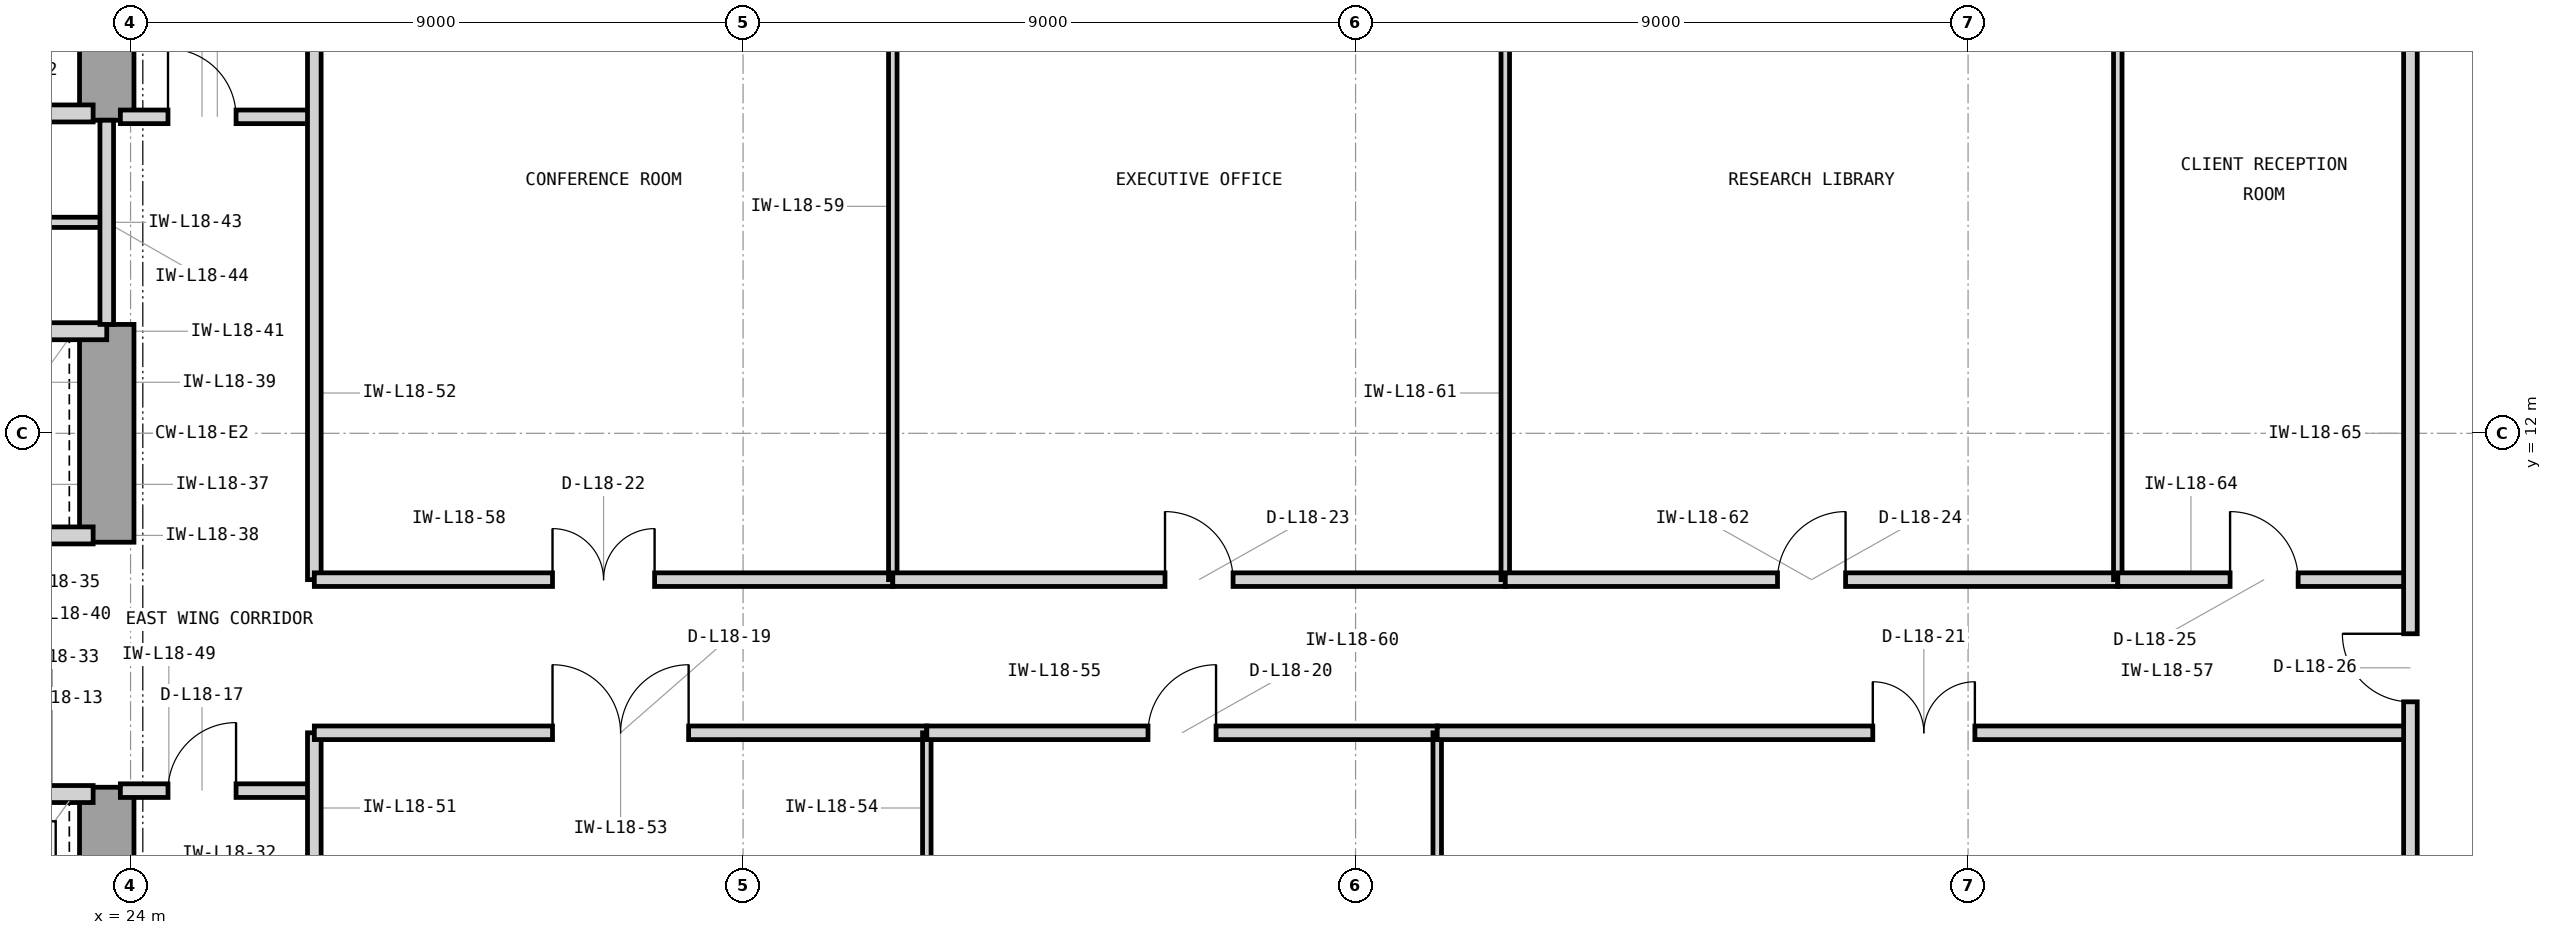
"""IFC4 building model, lengths in metres.
Left out: names, types, materials, properties, quantities, classifications, styles, units other than length and angle.
Written with IfcOpenShell. Run it as: python <this file> out.ifc"""

import sys

from ifc_helpers import new_model, si_unit, direction, frame, frame_2d, origin, place, context, subcontext, project, spatial, rectangle, extrude, element, fill, save


model = new_model("IFC4")
c1 = context("Model", 3, precision=1e-05, world=origin(), true_north=direction((0.0, 1.0)))
c2 = subcontext(c1, "Body", "Model", "MODEL_VIEW")
j1 = project(units=[si_unit("LENGTHUNIT", "METRE"), si_unit("PLANEANGLEUNIT", "RADIAN")], contexts=[c1])
p1 = place(None, origin())
s1 = spatial("IfcSite", under=j1, at=p1, CompositionType="ELEMENT")
p2 = place(p1, origin())
s2 = spatial("IfcBuilding", under=s1, at=p2, CompositionType="ELEMENT")
p3 = place(p2, frame((0.0, 0.0, 80.4)))
s3 = spatial("IfcBuildingStorey", under=s2, at=p3, CompositionType="ELEMENT", Elevation=80.4)
p4 = place(p3, frame((23.65, 3.75, 0.0), z_axis=(0.0, 0.0, 1.0), x_axis=(0.0, 1.0, 0.0)))
e1 = element("IfcWall", 1, at=p4, inside=s3, PredefinedType="SHEAR", context=c2, shape_type="SweptSolid", body=[
    extrude(rectangle(XDim=3.05, YDim=0.8, at=frame_2d((1.525, 0.0))), origin(), (0.0, 0.0, 1.0), 4.2),
])
p5 = place(p3, frame((23.65, 10.4, 0.0), z_axis=(0.0, 0.0, 1.0), x_axis=(0.0, 1.0, 0.0)))
e2 = element("IfcWall", 2, at=p5, inside=s3, PredefinedType="SHEAR", context=c2, shape_type="SweptSolid", body=[
    extrude(rectangle(XDim=3.2, YDim=0.8, at=frame_2d((1.6, 0.0))), origin(), (0.0, 0.0, 1.0), 4.2),
])
p6 = place(p3, frame((23.65, 16.6, 0.0), z_axis=(0.0, 0.0, 1.0), x_axis=(0.0, 1.0, 0.0)))
e3 = element("IfcWall", 3, at=p6, inside=s3, PredefinedType="SHEAR", context=c2, shape_type="SweptSolid", body=[
    extrude(rectangle(XDim=4.05, YDim=0.8, at=frame_2d((2.025, 0.0))), origin(), (0.0, 0.0, 1.0), 4.2),
])
p7 = place(p3, frame((21.05, 16.7, 0.0), z_axis=(0.0, 0.0, 1.0), x_axis=(1.0, 0.0, 0.0)))
e4 = element("IfcWall", 4, at=p7, inside=s3, PredefinedType="PARTITIONING", context=c2, shape_type="SweptSolid", body=[
    extrude(rectangle(XDim=2.4, YDim=0.25, at=frame_2d((1.2, 0.0))), origin(), (0.0, 0.0, 1.0), 3.293),
])
p8 = place(p3, frame((21.05, 6.7, 0.0), z_axis=(0.0, 0.0, 1.0), x_axis=(1.0, 0.0, 0.0)))
e5 = element("IfcWall", 5, at=p8, inside=s3, PredefinedType="PARTITIONING", context=c2, shape_type="SweptSolid", body=[
    extrude(rectangle(XDim=2.4, YDim=0.25, at=frame_2d((1.2, 0.0))), origin(), (0.0, 0.0, 1.0), 3.293),
])
p9 = place(p8, frame((0.48, 0.0, 0.0)))
e6 = element("IfcOpeningElement", 6, at=p9, cuts=e5, PredefinedType="OPENING", context=c2, shape_type="SweptSolid", body=[
    extrude(rectangle(XDim=1.15, YDim=2.25, at=frame_2d((0.575, 1.125))), frame((0.0, 0.135, 0.0), z_axis=(0.0, -1.0, 0.0), x_axis=(1.0, 0.0, 0.0)), (0.0, 0.0, 1.0), 0.27),
])
p10 = place(p3, frame((21.05, 10.5, 0.0), z_axis=(0.0, 0.0, 1.0), x_axis=(1.0, 0.0, 0.0)))
e7 = element("IfcWall", 7, at=p10, inside=s3, PredefinedType="PARTITIONING", context=c2, shape_type="SweptSolid", body=[
    extrude(rectangle(XDim=2.4, YDim=0.25, at=frame_2d((1.2, 0.0))), origin(), (0.0, 0.0, 1.0), 3.293),
])
p11 = place(p3, frame((14.7, 13.5, 0.0), z_axis=(0.0, 0.0, 1.0), x_axis=(1.0, 0.0, 0.0)))
e8 = element("IfcWall", 8, at=p11, inside=s3, PredefinedType="PARTITIONING", context=c2, shape_type="SweptSolid", body=[
    extrude(rectangle(XDim=8.95, YDim=0.25, at=frame_2d((4.475, 0.0))), origin(), (0.0, 0.0, 1.0), 3.293),
])
p12 = place(p3, frame((18.45, 15.1, 0.0), z_axis=(0.0, 0.0, 1.0), x_axis=(1.0, 0.0, 0.0)))
e9 = element("IfcWall", 9, at=p12, inside=s3, PredefinedType="PARTITIONING", context=c2, shape_type="SweptSolid", body=[
    extrude(rectangle(XDim=5.2, YDim=0.15, at=frame_2d((2.6, 0.0))), origin(), (0.0, 0.0, 1.0), 3.91),
])
p13 = place(p3, frame((23.65, 13.6, 0.0), z_axis=(0.0, 0.0, 1.0), x_axis=(0.0, 1.0, 0.0)))
e10 = element("IfcWall", 10, at=p13, inside=s3, PredefinedType="PARTITIONING", context=c2, shape_type="SweptSolid", body=[
    extrude(rectangle(XDim=3.0, YDim=0.2, at=frame_2d((1.5, 0.0))), origin(), (0.0, 0.0, 1.0), 3.91),
])
p14 = place(p3, frame((23.85, 6.75, 0.0), z_axis=(0.0, 0.0, 1.0), x_axis=(1.0, 0.0, 0.0)))
e11 = element("IfcWall", 11, at=p14, inside=s3, PredefinedType="PARTITIONING", context=c2, shape_type="SweptSolid", body=[
    extrude(rectangle(XDim=2.85, YDim=0.2, at=frame_2d((1.425, 0.0))), origin(), (0.0, 0.0, 1.0), 3.91),
])
p15 = place(p14, frame((0.7, 0.0, 0.0)))
e12 = element("IfcOpeningElement", 12, at=p15, cuts=e11, PredefinedType="OPENING", context=c2, shape_type="SweptSolid", body=[
    extrude(rectangle(XDim=1.0, YDim=2.15, at=frame_2d((0.5, 1.075))), frame((0.0, 0.11, 0.0), z_axis=(0.0, -1.0, 0.0), x_axis=(1.0, 0.0, 0.0)), (0.0, 0.0, 1.0), 0.22),
])
p16 = place(p3, frame((23.85, 16.65, 0.0), z_axis=(0.0, 0.0, 1.0), x_axis=(1.0, 0.0, 0.0)))
e13 = element("IfcWall", 13, at=p16, inside=s3, PredefinedType="PARTITIONING", context=c2, shape_type="SweptSolid", body=[
    extrude(rectangle(XDim=2.85, YDim=0.2, at=frame_2d((1.425, 0.0))), origin(), (0.0, 0.0, 1.0), 3.91),
])
p17 = place(p16, frame((0.7, 0.0, 0.0)))
e14 = element("IfcOpeningElement", 14, at=p17, cuts=e13, PredefinedType="OPENING", context=c2, shape_type="SweptSolid", body=[
    extrude(rectangle(XDim=1.0, YDim=2.15, at=frame_2d((0.5, 1.075))), frame((0.0, 0.11, 0.0), z_axis=(0.0, -1.0, 0.0), x_axis=(1.0, 0.0, 0.0)), (0.0, 0.0, 1.0), 0.22),
])
p18 = place(p3, frame((26.7, 3.18, 0.0), z_axis=(0.0, 0.0, 1.0), x_axis=(0.0, 1.0, 0.0)))
e15 = element("IfcWall", 15, at=p18, inside=s3, PredefinedType="PARTITIONING", context=c2, shape_type="SweptSolid", body=[
    extrude(rectangle(XDim=4.42, YDim=0.2, at=frame_2d((2.21, 0.0))), origin(), (0.0, 0.0, 1.0), 3.91),
])
p19 = place(p3, frame((26.7, 9.85, 0.0), z_axis=(0.0, 0.0, 1.0), x_axis=(0.0, 1.0, 0.0)))
e16 = element("IfcWall", 16, at=p19, inside=s3, PredefinedType="PARTITIONING", context=c2, shape_type="SweptSolid", body=[
    extrude(rectangle(XDim=10.97, YDim=0.2, at=frame_2d((5.485, 0.0))), origin(), (0.0, 0.0, 1.0), 3.91),
])
p20 = place(p3, frame((26.7, 7.6, 0.0), z_axis=(0.0, 0.0, 1.0), x_axis=(1.0, 0.0, 0.0)))
e17 = element("IfcWall", 17, at=p20, inside=s3, PredefinedType="PARTITIONING", context=c2, shape_type="SweptSolid", body=[
    extrude(rectangle(XDim=9.0, YDim=0.2, at=frame_2d((4.5, 0.0))), origin(), (0.0, 0.0, 1.0), 3.91),
])
p21 = place(p20, frame((3.5, 0.0, 0.0)))
e18 = element("IfcOpeningElement", 18, at=p21, cuts=e17, PredefinedType="OPENING", context=c2, shape_type="SweptSolid", body=[
    extrude(rectangle(XDim=2.0, YDim=2.5, at=frame_2d((1.0, 1.25))), frame((0.0, 0.11, 0.0), z_axis=(0.0, -1.0, 0.0), x_axis=(1.0, 0.0, 0.0)), (0.0, 0.0, 1.0), 0.22),
])
p22 = place(p3, frame((35.7, 3.18, 0.0), z_axis=(0.0, 0.0, 1.0), x_axis=(0.0, 1.0, 0.0)))
e19 = element("IfcWall", 19, at=p22, inside=s3, PredefinedType="PARTITIONING", context=c2, shape_type="SweptSolid", body=[
    extrude(rectangle(XDim=4.42, YDim=0.125, at=frame_2d((2.21, 0.0))), origin(), (0.0, 0.0, 1.0), 3.91),
])
p23 = place(p3, frame((35.7, 7.6, 0.0), z_axis=(0.0, 0.0, 1.0), x_axis=(1.0, 0.0, 0.0)))
e20 = element("IfcWall", 20, at=p23, inside=s3, PredefinedType="PARTITIONING", context=c2, shape_type="SweptSolid", body=[
    extrude(rectangle(XDim=7.5, YDim=0.2, at=frame_2d((3.75, 0.0))), origin(), (0.0, 0.0, 1.0), 3.91),
])
p24 = place(p23, frame((3.25, 0.0, 0.0)))
e21 = element("IfcOpeningElement", 21, at=p24, cuts=e20, PredefinedType="OPENING", context=c2, shape_type="SweptSolid", body=[
    extrude(rectangle(XDim=1.0, YDim=2.15, at=frame_2d((0.5, 1.075))), frame((0.0, 0.11, 0.0), z_axis=(0.0, -1.0, 0.0), x_axis=(1.0, 0.0, 0.0)), (0.0, 0.0, 1.0), 0.22),
])
p25 = place(p3, frame((43.2, 3.18, 0.0), z_axis=(0.0, 0.0, 1.0), x_axis=(0.0, 1.0, 0.0)))
e22 = element("IfcWall", 22, at=p25, inside=s3, PredefinedType="PARTITIONING", context=c2, shape_type="SweptSolid", body=[
    extrude(rectangle(XDim=4.42, YDim=0.125, at=frame_2d((2.21, 0.0))), origin(), (0.0, 0.0, 1.0), 3.91),
])
p26 = place(p3, frame((43.2, 7.6, 0.0), z_axis=(0.0, 0.0, 1.0), x_axis=(1.0, 0.0, 0.0)))
e23 = element("IfcWall", 23, at=p26, inside=s3, PredefinedType="PARTITIONING", context=c2, shape_type="SweptSolid", body=[
    extrude(rectangle(XDim=14.3, YDim=0.2, at=frame_2d((7.15, 0.0))), origin(), (0.0, 0.0, 1.0), 3.91),
])
p27 = place(p26, frame((6.4, 0.0, 0.0)))
e24 = element("IfcOpeningElement", 24, at=p27, cuts=e23, PredefinedType="OPENING", context=c2, shape_type="SweptSolid", body=[
    extrude(rectangle(XDim=1.5, YDim=2.3, at=frame_2d((0.75, 1.15))), frame((0.0, 0.11, 0.0), z_axis=(0.0, -1.0, 0.0), x_axis=(1.0, 0.0, 0.0)), (0.0, 0.0, 1.0), 0.22),
])
p28 = place(p3, frame((26.7, 9.85, 0.0), z_axis=(0.0, 0.0, 1.0), x_axis=(1.0, 0.0, 0.0)))
e25 = element("IfcWall", 25, at=p28, inside=s3, PredefinedType="PARTITIONING", context=c2, shape_type="SweptSolid", body=[
    extrude(rectangle(XDim=8.5, YDim=0.2, at=frame_2d((4.25, 0.0))), origin(), (0.0, 0.0, 1.0), 3.91),
])
p29 = place(p28, frame((3.5, 0.0, 0.0)))
e26 = element("IfcOpeningElement", 26, at=p29, cuts=e25, PredefinedType="OPENING", context=c2, shape_type="SweptSolid", body=[
    extrude(rectangle(XDim=1.5, YDim=2.3, at=frame_2d((0.75, 1.15))), frame((0.0, 0.11, 0.0), z_axis=(0.0, -1.0, 0.0), x_axis=(1.0, 0.0, 0.0)), (0.0, 0.0, 1.0), 0.22),
])
p30 = place(p3, frame((35.2, 9.85, 0.0), z_axis=(0.0, 0.0, 1.0), x_axis=(0.0, 1.0, 0.0)))
e27 = element("IfcWall", 27, at=p30, inside=s3, PredefinedType="PARTITIONING", context=c2, shape_type="SweptSolid", body=[
    extrude(rectangle(XDim=10.97, YDim=0.125, at=frame_2d((5.485, 0.0))), origin(), (0.0, 0.0, 1.0), 3.91),
])
p31 = place(p3, frame((35.2, 9.85, 0.0), z_axis=(0.0, 0.0, 1.0), x_axis=(1.0, 0.0, 0.0)))
e28 = element("IfcWall", 28, at=p31, inside=s3, PredefinedType="PARTITIONING", context=c2, shape_type="SweptSolid", body=[
    extrude(rectangle(XDim=9.0, YDim=0.2, at=frame_2d((4.5, 0.0))), origin(), (0.0, 0.0, 1.0), 3.91),
])
p32 = place(p31, frame((4.0, 0.0, 0.0)))
e29 = element("IfcOpeningElement", 29, at=p32, cuts=e28, PredefinedType="OPENING", context=c2, shape_type="SweptSolid", body=[
    extrude(rectangle(XDim=1.0, YDim=2.15, at=frame_2d((0.5, 1.075))), frame((0.0, 0.11, 0.0), z_axis=(0.0, -1.0, 0.0), x_axis=(1.0, 0.0, 0.0)), (0.0, 0.0, 1.0), 0.22),
])
p33 = place(p3, frame((44.2, 9.85, 0.0), z_axis=(0.0, 0.0, 1.0), x_axis=(0.0, 1.0, 0.0)))
e30 = element("IfcWall", 30, at=p33, inside=s3, PredefinedType="PARTITIONING", context=c2, shape_type="SweptSolid", body=[
    extrude(rectangle(XDim=10.97, YDim=0.125, at=frame_2d((5.485, 0.0))), origin(), (0.0, 0.0, 1.0), 3.91),
])
p34 = place(p3, frame((44.2, 9.85, 0.0), z_axis=(0.0, 0.0, 1.0), x_axis=(1.0, 0.0, 0.0)))
e31 = element("IfcWall", 31, at=p34, inside=s3, PredefinedType="PARTITIONING", context=c2, shape_type="SweptSolid", body=[
    extrude(rectangle(XDim=9.0, YDim=0.2, at=frame_2d((4.5, 0.0))), origin(), (0.0, 0.0, 1.0), 3.91),
])
p35 = place(p34, frame((4.0, 0.0, 0.0)))
e32 = element("IfcOpeningElement", 32, at=p35, cuts=e31, PredefinedType="OPENING", context=c2, shape_type="SweptSolid", body=[
    extrude(rectangle(XDim=1.0, YDim=2.15, at=frame_2d((0.5, 1.075))), frame((0.0, 0.11, 0.0), z_axis=(0.0, -1.0, 0.0), x_axis=(1.0, 0.0, 0.0)), (0.0, 0.0, 1.0), 0.22),
])
p36 = place(p3, frame((53.2, 9.85, 0.0), z_axis=(0.0, 0.0, 1.0), x_axis=(0.0, 1.0, 0.0)))
e33 = element("IfcWall", 33, at=p36, inside=s3, PredefinedType="PARTITIONING", context=c2, shape_type="SweptSolid", body=[
    extrude(rectangle(XDim=10.97, YDim=0.125, at=frame_2d((5.485, 0.0))), origin(), (0.0, 0.0, 1.0), 3.91),
])
p37 = place(p3, frame((53.2, 9.85, 0.0), z_axis=(0.0, 0.0, 1.0), x_axis=(1.0, 0.0, 0.0)))
e34 = element("IfcWall", 34, at=p37, inside=s3, PredefinedType="PARTITIONING", context=c2, shape_type="SweptSolid", body=[
    extrude(rectangle(XDim=4.3, YDim=0.2, at=frame_2d((2.15, 0.0))), origin(), (0.0, 0.0, 1.0), 3.91),
])
p38 = place(p37, frame((1.65, 0.0, 0.0)))
e35 = element("IfcOpeningElement", 35, at=p38, cuts=e34, PredefinedType="OPENING", context=c2, shape_type="SweptSolid", body=[
    extrude(rectangle(XDim=1.0, YDim=2.15, at=frame_2d((0.5, 1.075))), frame((0.0, 0.11, 0.0), z_axis=(0.0, -1.0, 0.0), x_axis=(1.0, 0.0, 0.0)), (0.0, 0.0, 1.0), 0.22),
])
p39 = place(p3, frame((57.5, 3.18, 0.0), z_axis=(0.0, 0.0, 1.0), x_axis=(0.0, 1.0, 0.0)))
e36 = element("IfcWall", 36, at=p39, inside=s3, PredefinedType="PARTITIONING", context=c2, shape_type="SweptSolid", body=[
    extrude(rectangle(XDim=17.64, YDim=0.2, at=frame_2d((8.82, 0.0))), origin(), (0.0, 0.0, 1.0), 3.91),
])
p40 = place(p39, frame((4.875, 0.0, 0.0)))
e37 = element("IfcOpeningElement", 37, at=p40, cuts=e36, PredefinedType="OPENING", context=c2, shape_type="SweptSolid", body=[
    extrude(rectangle(XDim=1.0, YDim=2.15, at=frame_2d((0.5, 1.075))), frame((0.0, 0.11, 0.0), z_axis=(0.0, -1.0, 0.0), x_axis=(1.0, 0.0, 0.0)), (0.0, 0.0, 1.0), 0.22),
])
p41 = place(p15, origin())
e38 = element("IfcDoor", 38, at=p41, inside=s3, OperationType="SINGLE_SWING_RIGHT", PredefinedType="DOOR", context=c2, shape_type="SweptSolid", body=[
    extrude(rectangle(XDim=1.0, YDim=2.15, at=frame_2d((0.5, 1.075))), frame((0.0, 0.025, 0.0), z_axis=(0.0, -1.0, 0.0), x_axis=(1.0, 0.0, 0.0)), (0.0, 0.0, 1.0), 0.05),
])
fill(e12, e38)
p42 = place(p17, origin())
e39 = element("IfcDoor", 39, at=p42, inside=s3, OperationType="SINGLE_SWING_LEFT", PredefinedType="DOOR", context=c2, shape_type="SweptSolid", body=[
    extrude(rectangle(XDim=1.0, YDim=2.15, at=frame_2d((0.5, 1.075))), frame((0.0, 0.025, 0.0), z_axis=(0.0, -1.0, 0.0), x_axis=(1.0, 0.0, 0.0)), (0.0, 0.0, 1.0), 0.05),
])
fill(e14, e39)
p43 = place(p21, origin())
e40 = element("IfcDoor", 40, at=p43, inside=s3, OperationType="DOUBLE_DOOR_SINGLE_SWING", PredefinedType="DOOR", context=c2, shape_type="SweptSolid", body=[
    extrude(rectangle(XDim=2.0, YDim=2.5, at=frame_2d((1.0, 1.25))), frame((0.0, 0.025, 0.0), z_axis=(0.0, -1.0, 0.0), x_axis=(1.0, 0.0, 0.0)), (0.0, 0.0, 1.0), 0.05),
])
fill(e18, e40)
p44 = place(p24, origin())
e41 = element("IfcDoor", 41, at=p44, inside=s3, OperationType="SINGLE_SWING_RIGHT", PredefinedType="DOOR", context=c2, shape_type="SweptSolid", body=[
    extrude(rectangle(XDim=1.0, YDim=2.15, at=frame_2d((0.5, 1.075))), frame((0.0, 0.025, 0.0), z_axis=(0.0, -1.0, 0.0), x_axis=(1.0, 0.0, 0.0)), (0.0, 0.0, 1.0), 0.05),
])
fill(e21, e41)
p45 = place(p27, origin())
e42 = element("IfcDoor", 42, at=p45, inside=s3, OperationType="DOUBLE_DOOR_SINGLE_SWING", PredefinedType="DOOR", context=c2, shape_type="SweptSolid", body=[
    extrude(rectangle(XDim=1.5, YDim=2.3, at=frame_2d((0.75, 1.15))), frame((0.0, 0.025, 0.0), z_axis=(0.0, -1.0, 0.0), x_axis=(1.0, 0.0, 0.0)), (0.0, 0.0, 1.0), 0.05),
])
fill(e24, e42)
p46 = place(p29, origin())
e43 = element("IfcDoor", 43, at=p46, inside=s3, OperationType="DOUBLE_DOOR_SINGLE_SWING", PredefinedType="DOOR", context=c2, shape_type="SweptSolid", body=[
    extrude(rectangle(XDim=1.5, YDim=2.3, at=frame_2d((0.75, 1.15))), frame((0.0, 0.025, 0.0), z_axis=(0.0, -1.0, 0.0), x_axis=(1.0, 0.0, 0.0)), (0.0, 0.0, 1.0), 0.05),
])
fill(e26, e43)
p47 = place(p32, origin())
e44 = element("IfcDoor", 44, at=p47, inside=s3, OperationType="SINGLE_SWING_LEFT", PredefinedType="DOOR", context=c2, shape_type="SweptSolid", body=[
    extrude(rectangle(XDim=1.0, YDim=2.15, at=frame_2d((0.5, 1.075))), frame((0.0, 0.025, 0.0), z_axis=(0.0, -1.0, 0.0), x_axis=(1.0, 0.0, 0.0)), (0.0, 0.0, 1.0), 0.05),
])
fill(e29, e44)
p48 = place(p35, origin())
e45 = element("IfcDoor", 45, at=p48, inside=s3, OperationType="SINGLE_SWING_RIGHT", PredefinedType="DOOR", context=c2, shape_type="SweptSolid", body=[
    extrude(rectangle(XDim=1.0, YDim=2.15, at=frame_2d((0.5, 1.075))), frame((0.0, 0.025, 0.0), z_axis=(0.0, -1.0, 0.0), x_axis=(1.0, 0.0, 0.0)), (0.0, 0.0, 1.0), 0.05),
])
fill(e32, e45)
p49 = place(p38, origin())
e46 = element("IfcDoor", 46, at=p49, inside=s3, OperationType="SINGLE_SWING_LEFT", PredefinedType="DOOR", context=c2, shape_type="SweptSolid", body=[
    extrude(rectangle(XDim=1.0, YDim=2.15, at=frame_2d((0.5, 1.075))), frame((0.0, 0.025, 0.0), z_axis=(0.0, -1.0, 0.0), x_axis=(1.0, 0.0, 0.0)), (0.0, 0.0, 1.0), 0.05),
])
fill(e35, e46)
p50 = place(p40, origin())
e47 = element("IfcDoor", 47, at=p50, inside=s3, OperationType="SINGLE_SWING_RIGHT", PredefinedType="DOOR", context=c2, shape_type="SweptSolid", body=[
    extrude(rectangle(XDim=1.0, YDim=2.15, at=frame_2d((0.5, 1.075))), frame((0.0, 0.025, 0.0), z_axis=(0.0, -1.0, 0.0), x_axis=(1.0, 0.0, 0.0)), (0.0, 0.0, 1.0), 0.05),
])
fill(e37, e47)
save(model, sys.argv[1])
